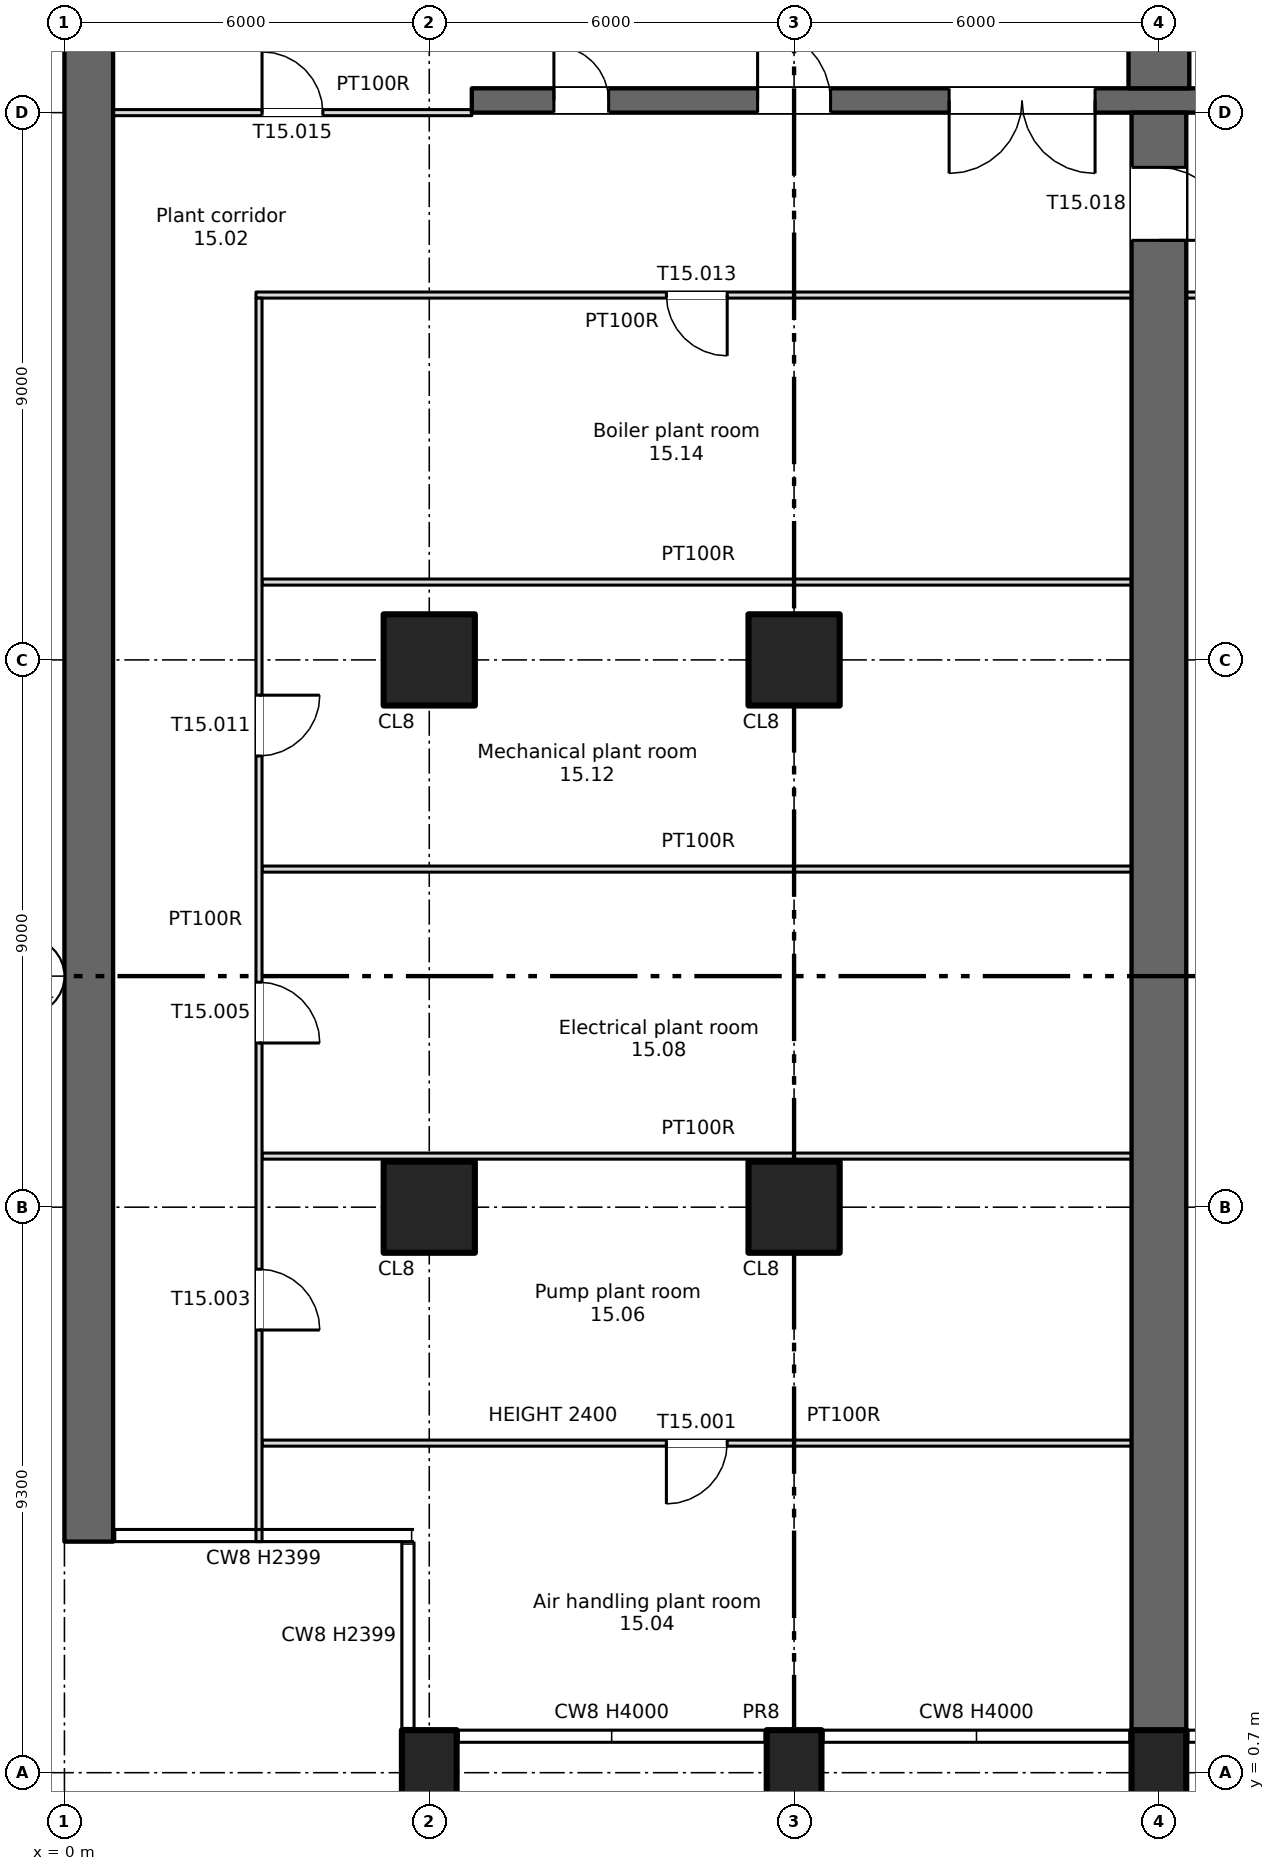
"""IFC4 building model, lengths in metres.
Left out: names, types, materials, properties, quantities, classifications, styles, units other than length and angle.
Written with IfcOpenShell. Run it as: python <this file> out.ifc"""

import sys

from ifc_helpers import new_model, si_unit, direction, frame, frame_2d, origin, origin_2d, place, context, subcontext, project, spatial, rectangle, extrude, element, fill, save


model = new_model("IFC4")
c1 = context("Model", 3, precision=1e-05, world=origin(), true_north=direction((0.0, 1.0)))
c2 = subcontext(c1, "Body", "Model", "MODEL_VIEW")
j1 = project(units=[si_unit("LENGTHUNIT", "METRE"), si_unit("PLANEANGLEUNIT", "RADIAN")], contexts=[c1])
p1 = place(None, origin())
s1 = spatial("IfcSite", under=j1, at=p1, CompositionType="ELEMENT")
p2 = place(p1, origin())
s2 = spatial("IfcBuilding", under=s1, at=p2, CompositionType="ELEMENT")
p3 = place(p2, frame((0.0, 0.0, 90.0)))
s3 = spatial("IfcBuildingStorey", under=s2, at=p3, CompositionType="ELEMENT", Elevation=90.0)
for number, where, z_axis, x_axis in (
    (1, (6.0, 0.7, -0.6), (0.0, 0.0, 1.0), (1.0, 0.0, 0.0)),
    (2, (12.0, 0.7, -0.6), (0.0, 0.0, 1.0), (1.0, 0.0, 0.0)),
    (3, (18.0, 0.7, -0.6), (0.0, 0.0, 1.0), (1.0, 0.0, 0.0)),
):
    element("IfcColumn", number, at=place(p3, frame(where, z_axis=z_axis, x_axis=x_axis)), inside=s3, PredefinedType="COLUMN", context=c2, shape_type="SweptSolid", body=[
        extrude(rectangle(XDim=0.9, YDim=1.4, at=origin_2d()), origin(), (0.0, 0.0, 1.0), 4.8),
    ])
for number, where, z_axis, x_axis in (
    (4, (6.0, 10.0, 0.0), (0.0, 0.0, 1.0), (1.0, 0.0, 0.0)),
    (5, (6.0, 19.0, 0.0), (0.0, 0.0, 1.0), (1.0, 0.0, 0.0)),
    (6, (12.0, 10.0, 0.0), (0.0, 0.0, 1.0), (1.0, 0.0, 0.0)),
    (7, (12.0, 19.0, 0.0), (0.0, 0.0, 1.0), (1.0, 0.0, 0.0)),
):
    element("IfcColumn", number, at=place(p3, frame(where, z_axis=z_axis, x_axis=x_axis)), inside=s3, PredefinedType="COLUMN", context=c2, shape_type="SweptSolid", body=[
        extrude(rectangle(XDim=1.5, YDim=1.5, at=origin_2d()), origin(), (0.0, 0.0, 1.0), 4.2),
    ])
p4 = place(p3, frame((0.4, 4.5, 0.0), z_axis=(0.0, 0.0, 1.0), x_axis=(0.0, 1.0, 0.0)))
e8 = element("IfcWall", 8, at=p4, inside=s3, PredefinedType="SHEAR", context=c2, shape_type="SweptSolid", body=[
    extrude(rectangle(XDim=37.0, YDim=0.8, at=frame_2d((18.5, 0.0))), origin(), (0.0, 0.0, 1.0), 4.2),
])
p5 = place(p3, frame((18.0, 1.4, 0.0), z_axis=(0.0, 0.0, 1.0), x_axis=(0.0, 1.0, 0.0)))
e9 = element("IfcWall", 9, at=p5, inside=s3, PredefinedType="SHEAR", context=c2, shape_type="SweptSolid", body=[
    extrude(rectangle(XDim=26.6, YDim=0.9, at=frame_2d((13.3, 0.0))), origin(), (0.0, 0.0, 1.0), 4.2),
])
p6 = place(p5, frame((24.5, 0.0, 0.0)))
e10 = element("IfcOpeningElement", 10, at=p6, cuts=e9, PredefinedType="OPENING", context=c2, shape_type="SweptSolid", body=[
    extrude(rectangle(XDim=1.2, YDim=2.1, at=frame_2d((0.6, 1.05))), frame((0.0, 0.46, 0.0), z_axis=(0.0, -1.0, 0.0), x_axis=(1.0, 0.0, 0.0)), (0.0, 0.0, 1.0), 0.92),
])
p7 = place(p3, frame((6.7, 28.2, 0.0), z_axis=(0.0, 0.0, 1.0), x_axis=(1.0, 0.0, 0.0)))
e11 = element("IfcWall", 11, at=p7, inside=s3, PredefinedType="SHEAR", context=c2, shape_type="SweptSolid", body=[
    extrude(rectangle(XDim=57.8, YDim=0.4, at=frame_2d((28.9, 0.0))), origin(), (0.0, 0.0, 1.0), 4.2),
])
p8 = place(p7, frame((13.85, 0.0, 0.0)))
e12 = element("IfcOpeningElement", 12, at=p8, cuts=e11, PredefinedType="OPENING", context=c2, shape_type="SweptSolid", body=[
    extrude(rectangle(XDim=0.9, YDim=2.1, at=frame_2d((0.45, 1.05))), frame((0.0, 0.21, 0.0), z_axis=(0.0, -1.0, 0.0), x_axis=(1.0, 0.0, 0.0)), (0.0, 0.0, 1.0), 0.42),
])
p9 = place(p7, frame((49.85, 0.0, 0.0)))
e13 = element("IfcOpeningElement", 13, at=p9, cuts=e11, PredefinedType="OPENING", context=c2, shape_type="SweptSolid", body=[
    extrude(rectangle(XDim=0.9, YDim=2.1, at=frame_2d((0.45, 1.05))), frame((0.0, 0.21, 0.0), z_axis=(0.0, -1.0, 0.0), x_axis=(1.0, 0.0, 0.0)), (0.0, 0.0, 1.0), 0.42),
])
p10 = place(p7, frame((1.35, 0.0, 0.0)))
e14 = element("IfcOpeningElement", 14, at=p10, cuts=e11, PredefinedType="OPENING", context=c2, shape_type="SweptSolid", body=[
    extrude(rectangle(XDim=0.9, YDim=2.1, at=frame_2d((0.45, 1.05))), frame((0.0, 0.21, 0.0), z_axis=(0.0, -1.0, 0.0), x_axis=(1.0, 0.0, 0.0)), (0.0, 0.0, 1.0), 0.42),
])
p11 = place(p7, frame((4.7, 0.0, 0.0)))
e15 = element("IfcOpeningElement", 15, at=p11, cuts=e11, PredefinedType="OPENING", context=c2, shape_type="SweptSolid", body=[
    extrude(rectangle(XDim=1.2, YDim=2.1, at=frame_2d((0.6, 1.05))), frame((0.0, 0.21, 0.0), z_axis=(0.0, -1.0, 0.0), x_axis=(1.0, 0.0, 0.0)), (0.0, 0.0, 1.0), 0.42),
])
p12 = place(p7, frame((31.7, 0.0, 0.0)))
e16 = element("IfcOpeningElement", 16, at=p12, cuts=e11, PredefinedType="OPENING", context=c2, shape_type="SweptSolid", body=[
    extrude(rectangle(XDim=1.2, YDim=2.1, at=frame_2d((0.6, 1.05))), frame((0.0, 0.21, 0.0), z_axis=(0.0, -1.0, 0.0), x_axis=(1.0, 0.0, 0.0)), (0.0, 0.0, 1.0), 0.42),
])
p13 = place(p7, frame((55.2, 0.0, 0.0)))
e17 = element("IfcOpeningElement", 17, at=p13, cuts=e11, PredefinedType="OPENING", context=c2, shape_type="SweptSolid", body=[
    extrude(rectangle(XDim=1.2, YDim=2.1, at=frame_2d((0.6, 1.05))), frame((0.0, 0.21, 0.0), z_axis=(0.0, -1.0, 0.0), x_axis=(1.0, 0.0, 0.0)), (0.0, 0.0, 1.0), 0.42),
])
p14 = place(p7, frame((21.7, 0.0, 0.0)))
e18 = element("IfcOpeningElement", 18, at=p14, cuts=e11, PredefinedType="OPENING", context=c2, shape_type="SweptSolid", body=[
    extrude(rectangle(XDim=1.2, YDim=2.1, at=frame_2d((0.6, 1.05))), frame((0.0, 0.21, 0.0), z_axis=(0.0, -1.0, 0.0), x_axis=(1.0, 0.0, 0.0)), (0.0, 0.0, 1.0), 0.42),
])
p15 = place(p7, frame((41.7, 0.0, 0.0)))
e19 = element("IfcOpeningElement", 19, at=p15, cuts=e11, PredefinedType="OPENING", context=c2, shape_type="SweptSolid", body=[
    extrude(rectangle(XDim=1.2, YDim=2.1, at=frame_2d((0.6, 1.05))), frame((0.0, 0.21, 0.0), z_axis=(0.0, -1.0, 0.0), x_axis=(1.0, 0.0, 0.0)), (0.0, 0.0, 1.0), 0.42),
])
p16 = place(p7, frame((24.85, 0.0, 0.0)))
e20 = element("IfcOpeningElement", 20, at=p16, cuts=e11, PredefinedType="OPENING", context=c2, shape_type="SweptSolid", body=[
    extrude(rectangle(XDim=2.4, YDim=2.1, at=frame_2d((1.2, 1.05))), frame((0.0, 0.21, 0.0), z_axis=(0.0, -1.0, 0.0), x_axis=(1.0, 0.0, 0.0)), (0.0, 0.0, 1.0), 0.42),
])
p17 = place(p7, frame((37.35, 0.0, 0.0)))
e21 = element("IfcOpeningElement", 21, at=p17, cuts=e11, PredefinedType="OPENING", context=c2, shape_type="SweptSolid", body=[
    extrude(rectangle(XDim=2.4, YDim=2.1, at=frame_2d((1.2, 1.05))), frame((0.0, 0.21, 0.0), z_axis=(0.0, -1.0, 0.0), x_axis=(1.0, 0.0, 0.0)), (0.0, 0.0, 1.0), 0.42),
])
p18 = place(p7, frame((7.85, 0.0, 0.0)))
e22 = element("IfcOpeningElement", 22, at=p18, cuts=e11, PredefinedType="OPENING", context=c2, shape_type="SweptSolid", body=[
    extrude(rectangle(XDim=2.4, YDim=2.1, at=frame_2d((1.2, 1.05))), frame((0.0, 0.21, 0.0), z_axis=(0.0, -1.0, 0.0), x_axis=(1.0, 0.0, 0.0)), (0.0, 0.0, 1.0), 0.42),
])
p19 = place(p7, frame((28.85, 0.0, 0.0)))
e23 = element("IfcOpeningElement", 23, at=p19, cuts=e11, PredefinedType="OPENING", context=c2, shape_type="SweptSolid", body=[
    extrude(rectangle(XDim=0.9, YDim=2.1, at=frame_2d((0.45, 1.05))), frame((0.0, 0.21, 0.0), z_axis=(0.0, -1.0, 0.0), x_axis=(1.0, 0.0, 0.0)), (0.0, 0.0, 1.0), 0.42),
])
p20 = place(p7, frame((34.85, 0.0, 0.0)))
e24 = element("IfcOpeningElement", 24, at=p20, cuts=e11, PredefinedType="OPENING", context=c2, shape_type="SweptSolid", body=[
    extrude(rectangle(XDim=0.9, YDim=2.1, at=frame_2d((0.45, 1.05))), frame((0.0, 0.21, 0.0), z_axis=(0.0, -1.0, 0.0), x_axis=(1.0, 0.0, 0.0)), (0.0, 0.0, 1.0), 0.42),
])
p21 = place(p3, frame((6.85, 28.4, 0.0), z_axis=(0.0, 0.0, 1.0), x_axis=(0.0, 1.0, 0.0)))
e25 = element("IfcWall", 25, at=p21, inside=s3, PredefinedType="SHEAR", context=c2, shape_type="SweptSolid", body=[
    extrude(rectangle(XDim=16.6, YDim=0.3, at=frame_2d((8.3, 0.0))), origin(), (0.0, 0.0, 1.0), 4.2),
])
p22 = place(p3, frame((18.0, 28.4, 0.0), z_axis=(0.0, 0.0, 1.0), x_axis=(0.0, 1.0, 0.0)))
e26 = element("IfcWall", 26, at=p22, inside=s3, PredefinedType="SHEAR", context=c2, shape_type="SweptSolid", body=[
    extrude(rectangle(XDim=16.6, YDim=1.0, at=frame_2d((8.3, 0.0))), origin(), (0.0, 0.0, 1.0), 4.2),
])
p23 = place(p22, frame((9.6, 0.0, 0.0)))
e27 = element("IfcOpeningElement", 27, at=p23, cuts=e26, PredefinedType="OPENING", context=c2, shape_type="SweptSolid", body=[
    extrude(rectangle(XDim=2.0, YDim=2.1, at=frame_2d((1.0, 1.05))), frame((0.0, 0.51, 0.0), z_axis=(0.0, -1.0, 0.0), x_axis=(1.0, 0.0, 0.0)), (0.0, 0.0, 1.0), 1.02),
])
p24 = place(p22, frame((15.25, 0.0, 0.0)))
e28 = element("IfcOpeningElement", 28, at=p24, cuts=e26, PredefinedType="OPENING", context=c2, shape_type="SweptSolid", body=[
    extrude(rectangle(XDim=1.2, YDim=2.1, at=frame_2d((0.6, 1.05))), frame((0.0, 0.51, 0.0), z_axis=(0.0, -1.0, 0.0), x_axis=(1.0, 0.0, 0.0)), (0.0, 0.0, 1.0), 1.02),
])
for number, where, z_axis, x_axis in (
    (29, (10.15, 28.4, 0.0), (0.0, 0.0, 1.0), (0.0, 1.0, 0.0)),
    (30, (13.85, 28.4, 0.0), (0.0, 0.0, 1.0), (0.0, 1.0, 0.0)),
):
    element("IfcWall", number, at=place(p3, frame(where, z_axis=z_axis, x_axis=x_axis)), inside=s3, PredefinedType="SHEAR", context=c2, shape_type="SweptSolid", body=[
        extrude(rectangle(XDim=6.1, YDim=0.3, at=frame_2d((3.05, 0.0))), origin(), (0.0, 0.0, 1.0), 4.2),
    ])
p25 = place(p3, frame((3.25, 6.12, 0.0), z_axis=(0.0, 0.0, 1.0), x_axis=(1.0, 0.0, 0.0)))
e31 = element("IfcWall", 31, at=p25, inside=s3, PredefinedType="PARTITIONING", context=c2, shape_type="SweptSolid", body=[
    extrude(rectangle(XDim=14.35, YDim=0.1, at=frame_2d((7.175, 0.0))), origin(), (0.0, 0.0, 1.0), 2.4),
])
p26 = place(p25, frame((6.65, 0.0, 0.0)))
e32 = element("IfcOpeningElement", 32, at=p26, cuts=e31, PredefinedType="OPENING", context=c2, shape_type="SweptSolid", body=[
    extrude(rectangle(XDim=1.0, YDim=2.1, at=frame_2d((0.5, 1.05))), frame((0.0, 0.06, 0.0), z_axis=(0.0, -1.0, 0.0), x_axis=(1.0, 0.0, 0.0)), (0.0, 0.0, 1.0), 0.12),
])
for number, where, z_axis, x_axis in (
    (33, (3.25, 10.84, 0.0), (0.0, 0.0, 1.0), (1.0, 0.0, 0.0)),
    (34, (3.25, 15.56, 0.0), (0.0, 0.0, 1.0), (1.0, 0.0, 0.0)),
    (35, (3.25, 20.28, 0.0), (0.0, 0.0, 1.0), (1.0, 0.0, 0.0)),
):
    element("IfcWall", number, at=place(p3, frame(where, z_axis=z_axis, x_axis=x_axis)), inside=s3, PredefinedType="PARTITIONING", context=c2, shape_type="SweptSolid", body=[
        extrude(rectangle(XDim=14.35, YDim=0.1, at=frame_2d((7.175, 0.0))), origin(), (0.0, 0.0, 1.0), 4.2),
    ])
p27 = place(p3, frame((3.15, 25.0, 0.0), z_axis=(0.0, 0.0, 1.0), x_axis=(1.0, 0.0, 0.0)))
e36 = element("IfcWall", 36, at=p27, inside=s3, PredefinedType="PARTITIONING", context=c2, shape_type="SweptSolid", body=[
    extrude(rectangle(XDim=14.45, YDim=0.1, at=frame_2d((7.225, 0.0))), origin(), (0.0, 0.0, 1.0), 4.2),
])
p28 = place(p27, frame((6.75, 0.0, 0.0)))
e37 = element("IfcOpeningElement", 37, at=p28, cuts=e36, PredefinedType="OPENING", context=c2, shape_type="SweptSolid", body=[
    extrude(rectangle(XDim=1.0, YDim=2.1, at=frame_2d((0.5, 1.05))), frame((0.0, 0.06, 0.0), z_axis=(0.0, -1.0, 0.0), x_axis=(1.0, 0.0, 0.0)), (0.0, 0.0, 1.0), 0.12),
])
p29 = place(p3, frame((18.4, 25.0, 0.0), z_axis=(0.0, 0.0, 1.0), x_axis=(1.0, 0.0, 0.0)))
e38 = element("IfcWall", 38, at=p29, inside=s3, PredefinedType="PARTITIONING", context=c2, shape_type="SweptSolid", body=[
    extrude(rectangle(XDim=12.65, YDim=0.1, at=frame_2d((6.325, 0.0))), origin(), (0.0, 0.0, 1.0), 4.2),
])
p30 = place(p3, frame((0.8, 28.0, 0.0), z_axis=(0.0, 0.0, 1.0), x_axis=(1.0, 0.0, 0.0)))
e39 = element("IfcWall", 39, at=p30, inside=s3, PredefinedType="PARTITIONING", context=c2, shape_type="SweptSolid", body=[
    extrude(rectangle(XDim=5.9, YDim=0.1, at=frame_2d((2.95, 0.0))), origin(), (0.0, 0.0, 1.0), 4.2),
])
p31 = place(p30, frame((2.45, 0.0, 0.0)))
e40 = element("IfcOpeningElement", 40, at=p31, cuts=e39, PredefinedType="OPENING", context=c2, shape_type="SweptSolid", body=[
    extrude(rectangle(XDim=1.0, YDim=2.1, at=frame_2d((0.5, 1.05))), frame((0.0, 0.06, 0.0), z_axis=(0.0, -1.0, 0.0), x_axis=(1.0, 0.0, 0.0)), (0.0, 0.0, 1.0), 0.12),
])
p32 = place(p3, frame((3.2, 4.5, 0.0), z_axis=(0.0, 0.0, 1.0), x_axis=(0.0, 1.0, 0.0)))
e41 = element("IfcWall", 41, at=p32, inside=s3, PredefinedType="PARTITIONING", context=c2, shape_type="SweptSolid", body=[
    extrude(rectangle(XDim=20.45, YDim=0.1, at=frame_2d((10.225, 0.0))), origin(), (0.0, 0.0, 1.0), 4.2),
])
p33 = place(p32, frame((3.48, 0.0, 0.0)))
e42 = element("IfcOpeningElement", 42, at=p33, cuts=e41, PredefinedType="OPENING", context=c2, shape_type="SweptSolid", body=[
    extrude(rectangle(XDim=1.0, YDim=2.1, at=frame_2d((0.5, 1.05))), frame((0.0, 0.06, 0.0), z_axis=(0.0, -1.0, 0.0), x_axis=(1.0, 0.0, 0.0)), (0.0, 0.0, 1.0), 0.12),
])
p34 = place(p32, frame((8.2, 0.0, 0.0)))
e43 = element("IfcOpeningElement", 43, at=p34, cuts=e41, PredefinedType="OPENING", context=c2, shape_type="SweptSolid", body=[
    extrude(rectangle(XDim=1.0, YDim=2.1, at=frame_2d((0.5, 1.05))), frame((0.0, 0.06, 0.0), z_axis=(0.0, -1.0, 0.0), x_axis=(1.0, 0.0, 0.0)), (0.0, 0.0, 1.0), 0.12),
])
p35 = place(p32, frame((12.92, 0.0, 0.0)))
e44 = element("IfcOpeningElement", 44, at=p35, cuts=e41, PredefinedType="OPENING", context=c2, shape_type="SweptSolid", body=[
    extrude(rectangle(XDim=1.0, YDim=2.1, at=frame_2d((0.5, 1.05))), frame((0.0, 0.06, 0.0), z_axis=(0.0, -1.0, 0.0), x_axis=(1.0, 0.0, 0.0)), (0.0, 0.0, 1.0), 0.12),
])
p36 = place(p10, origin())
e45 = element("IfcDoor", 45, at=p36, inside=s3, OperationType="SINGLE_SWING_LEFT", PredefinedType="DOOR", context=c2, shape_type="SweptSolid", body=[
    extrude(rectangle(XDim=0.9, YDim=2.1, at=frame_2d((0.45, 1.05))), frame((0.0, 0.025, 0.0), z_axis=(0.0, -1.0, 0.0), x_axis=(1.0, 0.0, 0.0)), (0.0, 0.0, 1.0), 0.05),
])
fill(e14, e45)
p37 = place(p11, origin())
e46 = element("IfcDoor", 46, at=p37, inside=s3, OperationType="SINGLE_SWING_LEFT", PredefinedType="DOOR", context=c2, shape_type="SweptSolid", body=[
    extrude(rectangle(XDim=1.2, YDim=2.1, at=frame_2d((0.6, 1.05))), frame((0.0, 0.025, 0.0), z_axis=(0.0, -1.0, 0.0), x_axis=(1.0, 0.0, 0.0)), (0.0, 0.0, 1.0), 0.05),
])
fill(e15, e46)
p38 = place(p18, origin())
e47 = element("IfcDoor", 47, at=p38, inside=s3, OperationType="DOUBLE_DOOR_SINGLE_SWING", PredefinedType="DOOR", context=c2, shape_type="SweptSolid", body=[
    extrude(rectangle(XDim=2.4, YDim=2.1, at=frame_2d((1.2, 1.05))), frame((0.0, 0.025, 0.0), z_axis=(0.0, -1.0, 0.0), x_axis=(1.0, 0.0, 0.0)), (0.0, 0.0, 1.0), 0.05),
])
fill(e22, e47)
p39 = place(p26, origin())
e48 = element("IfcDoor", 48, at=p39, inside=s3, OperationType="SINGLE_SWING_LEFT", PredefinedType="DOOR", context=c2, shape_type="SweptSolid", body=[
    extrude(rectangle(XDim=1.0, YDim=2.1, at=frame_2d((0.5, 1.05))), frame((0.0, 0.025, 0.0), z_axis=(0.0, -1.0, 0.0), x_axis=(1.0, 0.0, 0.0)), (0.0, 0.0, 1.0), 0.05),
])
fill(e32, e48)
p40 = place(p33, origin())
e49 = element("IfcDoor", 49, at=p40, inside=s3, OperationType="SINGLE_SWING_LEFT", PredefinedType="DOOR", context=c2, shape_type="SweptSolid", body=[
    extrude(rectangle(XDim=1.0, YDim=2.1, at=frame_2d((0.5, 1.05))), frame((0.0, 0.025, 0.0), z_axis=(0.0, -1.0, 0.0), x_axis=(1.0, 0.0, 0.0)), (0.0, 0.0, 1.0), 0.05),
])
fill(e42, e49)
p41 = place(p34, origin())
e50 = element("IfcDoor", 50, at=p41, inside=s3, OperationType="SINGLE_SWING_LEFT", PredefinedType="DOOR", context=c2, shape_type="SweptSolid", body=[
    extrude(rectangle(XDim=1.0, YDim=2.1, at=frame_2d((0.5, 1.05))), frame((0.0, 0.025, 0.0), z_axis=(0.0, -1.0, 0.0), x_axis=(1.0, 0.0, 0.0)), (0.0, 0.0, 1.0), 0.05),
])
fill(e43, e50)
p42 = place(p35, origin())
e51 = element("IfcDoor", 51, at=p42, inside=s3, OperationType="SINGLE_SWING_RIGHT", PredefinedType="DOOR", context=c2, shape_type="SweptSolid", body=[
    extrude(rectangle(XDim=1.0, YDim=2.1, at=frame_2d((0.5, 1.05))), frame((0.0, 0.025, 0.0), z_axis=(0.0, -1.0, 0.0), x_axis=(1.0, 0.0, 0.0)), (0.0, 0.0, 1.0), 0.05),
])
fill(e44, e51)
p43 = place(p28, origin())
e52 = element("IfcDoor", 52, at=p43, inside=s3, OperationType="SINGLE_SWING_RIGHT", PredefinedType="DOOR", context=c2, shape_type="SweptSolid", body=[
    extrude(rectangle(XDim=1.0, YDim=2.1, at=frame_2d((0.5, 1.05))), frame((0.0, 0.025, 0.0), z_axis=(0.0, -1.0, 0.0), x_axis=(1.0, 0.0, 0.0)), (0.0, 0.0, 1.0), 0.05),
])
fill(e37, e52)
p44 = place(p31, origin())
e53 = element("IfcDoor", 53, at=p44, inside=s3, OperationType="SINGLE_SWING_LEFT", PredefinedType="DOOR", context=c2, shape_type="SweptSolid", body=[
    extrude(rectangle(XDim=1.0, YDim=2.1, at=frame_2d((0.5, 1.05))), frame((0.0, 0.025, 0.0), z_axis=(0.0, -1.0, 0.0), x_axis=(1.0, 0.0, 0.0)), (0.0, 0.0, 1.0), 0.05),
])
fill(e40, e53)
p45 = place(p6, origin())
e54 = element("IfcDoor", 54, at=p45, inside=s3, OperationType="SINGLE_SWING_LEFT", PredefinedType="DOOR", context=c2, shape_type="SweptSolid", body=[
    extrude(rectangle(XDim=1.2, YDim=2.1, at=frame_2d((0.6, 1.05))), frame((0.0, 0.025, 0.0), z_axis=(0.0, -1.0, 0.0), x_axis=(1.0, 0.0, 0.0)), (0.0, 0.0, 1.0), 0.05),
])
fill(e10, e54)
save(model, sys.argv[1])
